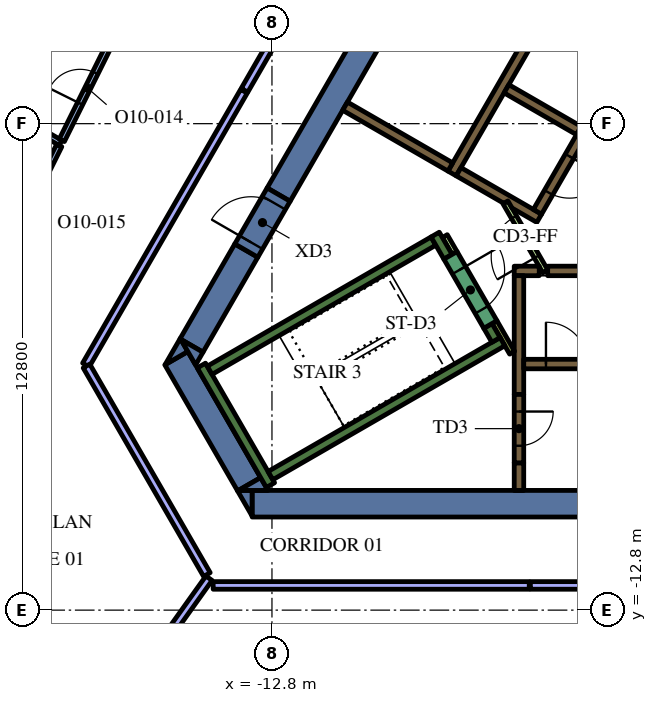
"""IFC4 building model, lengths in metres.
Left out: names, types, materials, properties, quantities, classifications, styles, units other than length and angle.
Written with IfcOpenShell. Run it as: python <this file> out.ifc"""

import sys

from ifc_helpers import new_model, si_unit, direction, frame, frame_2d, origin, place, context, subcontext, project, spatial, polyline, rectangle, outline, extrude, element, fill, save


model = new_model("IFC4")
c1 = context("Model", 3, precision=1e-05, world=origin(), true_north=direction((0.0, 1.0)))
c2 = subcontext(c1, "Body", "Model", "MODEL_VIEW")
j1 = project(units=[si_unit("LENGTHUNIT", "METRE"), si_unit("PLANEANGLEUNIT", "RADIAN")], contexts=[c1])
p1 = place(None, origin())
s1 = spatial("IfcSite", under=j1, at=p1, CompositionType="ELEMENT")
p2 = place(p1, origin())
s2 = spatial("IfcBuilding", under=s1, at=p2, CompositionType="ELEMENT")
p3 = place(p2, frame((0.0, 0.0, 252.0)))
s3 = spatial("IfcBuildingStorey", under=s2, at=p3, CompositionType="ELEMENT", Elevation=252.0)
p4 = place(p3, frame((8.904, -10.0, 0.0), z_axis=(0.0, 0.0, 1.0), x_axis=(-1.0, 0.0, 0.0)))
e1 = element("IfcWall", 1, at=p4, inside=s3, PredefinedType="SOLIDWALL", context=c2, shape_type="SweptSolid", body=[
    extrude(rectangle(XDim=22.226, YDim=0.7, at=frame_2d((11.113, 0.0))), origin(), (0.0, 0.0, 1.0), 4.2),
])
p5 = place(p3, origin())
e2 = element("IfcWall", 2, at=p5, inside=s3, PredefinedType="SOLIDWALL", context=c2, shape_type="SweptSolid", body=[
    extrude(outline(polyline([(-13.712, -9.65), (-13.324, -9.65), (-13.324, -10.322), (-13.712, -9.65)])), origin(), (0.0, 0.0, 1.0), 4.2),
])
p6 = place(p3, frame((-13.402, -9.487, 0.0), z_axis=(0.0, 0.0, 1.0), x_axis=(-0.500020498207, 0.866013568815, 0.0)))
e3 = element("IfcWall", 3, at=p6, inside=s3, PredefinedType="SOLIDWALL", context=c2, shape_type="SweptSolid", body=[
    extrude(rectangle(XDim=3.829, YDim=0.7, at=frame_2d((1.915, 0.0))), origin(), (0.0, 0.0, 1.0), 4.2),
])
e4 = element("IfcWall", 4, at=p5, inside=s3, PredefinedType="SOLIDWALL", context=c2, shape_type="SweptSolid", body=[
    extrude(outline(polyline([(-15.014, -5.995), (-15.611, -6.339), (-15.213, -5.65), (-15.014, -5.995)])), origin(), (0.0, 0.0, 1.0), 4.2),
])
e5 = element("IfcWall", 5, at=p5, inside=s3, PredefinedType="SOLIDWALL", context=c2, shape_type="SweptSolid", body=[
    extrude(outline(polyline([(-12.904, -9.65), (-13.68, -9.65), (-13.098, -9.314), (-12.904, -9.65)])), origin(), (0.0, 0.0, 1.0), 4.2),
])
p7 = place(p3, frame((-13.475, -3.339, 0.0), z_axis=(0.0, 0.0, 1.0), x_axis=(-0.500008214683, -0.866020660983, 0.0)))
e6 = element("IfcWall", 6, at=p7, inside=s3, PredefinedType="SOLIDWALL", context=c2, shape_type="SweptSolid", body=[
    extrude(rectangle(XDim=2.884, YDim=0.7, at=frame_2d((1.442, 0.0))), origin(), (0.0, 0.0, 1.0), 4.2),
])
e7 = element("IfcWall", 7, at=p5, inside=s3, PredefinedType="SOLIDWALL", context=c2, shape_type="SweptSolid", body=[
    extrude(outline(polyline([(-14.809, -6.35), (-15.197, -5.678), (-14.615, -6.014), (-14.809, -6.35)])), origin(), (0.0, 0.0, 1.0), 4.2),
])
p8 = place(p3, frame((-12.625, -1.867, 0.0), z_axis=(0.0, 0.0, 1.0), x_axis=(0.499996974394, 0.866027150612, 0.0)))
e8 = element("IfcWall", 8, at=p8, inside=s3, PredefinedType="SOLIDWALL", context=c2, shape_type="SweptSolid", body=[
    extrude(rectangle(XDim=15.858, YDim=0.7, at=frame_2d((7.929, 0.0))), origin(), (0.0, 0.0, 1.0), 4.2),
])
p9 = place(p3, frame((-12.84, -9.511, 0.0), z_axis=(0.0, 0.0, 1.0), x_axis=(-0.499997733992, 0.866026712061, 0.0)))
e9 = element("IfcWall", 9, at=p9, inside=s3, PredefinedType="SOLIDWALL", context=c2, shape_type="SweptSolid", body=[
    extrude(rectangle(XDim=3.634, YDim=0.25, at=frame_2d((1.817, 0.0))), origin(), (0.0, 0.0, 1.0), 4.2),
])
p10 = place(p3, frame((-14.44, -6.49, 0.0), z_axis=(0.0, 0.0, 1.0), x_axis=(0.866022966069, 0.500004222222, 0.0)))
e10 = element("IfcWall", 10, at=p10, inside=s3, PredefinedType="SOLIDWALL", context=c2, shape_type="SweptSolid", body=[
    extrude(rectangle(XDim=6.8, YDim=0.25, at=frame_2d((3.4, 0.0))), origin(), (0.0, 0.0, 1.0), 4.2),
])
p11 = place(p3, frame((-8.168, -3.503, 0.0), z_axis=(0.0, 0.0, 1.0), x_axis=(-0.499952099219, 0.866053057547, 0.0)))
e11 = element("IfcWall", 11, at=p11, inside=s3, PredefinedType="SOLIDWALL", context=c2, shape_type="SweptSolid", body=[
    extrude(rectangle(XDim=0.675, YDim=0.25, at=frame_2d((0.337, 0.0))), origin(), (0.0, 0.0, 1.0), 4.2),
])
p12 = place(p3, frame((-12.84, -9.261, 0.0), z_axis=(0.0, 0.0, 1.0), x_axis=(0.866016039709, 0.500016218704, 0.0)))
e12 = element("IfcWall", 12, at=p12, inside=s3, PredefinedType="SOLIDWALL", context=c2, shape_type="SweptSolid", body=[
    extrude(rectangle(XDim=7.05, YDim=0.25, at=frame_2d((3.525, 0.0))), origin(), (0.0, 0.0, 1.0), 4.2),
])
p13 = place(p3, frame((-6.905, -5.69, 0.0), z_axis=(0.0, 0.0, 1.0), x_axis=(-0.500402024738, 0.865793170242, 0.0)))
e13 = element("IfcWall", 13, at=p13, inside=s3, PredefinedType="SOLIDWALL", context=c2, shape_type="SweptSolid", body=[
    extrude(rectangle(XDim=0.425, YDim=0.25, at=frame_2d((0.212, 0.0))), origin(), (0.0, 0.0, 1.0), 4.2),
])
p14 = place(p3, frame((-6.3, -8.925, 0.0), z_axis=(0.0, 0.0, 1.0), x_axis=(0.0, -1.0, 0.0)))
e14 = element("IfcWall", 14, at=p14, inside=s3, PredefinedType="SOLIDWALL", context=c2, shape_type="SweptSolid", body=[
    extrude(rectangle(XDim=0.725, YDim=0.25, at=frame_2d((0.363, 0.0))), origin(), (0.0, 0.0, 1.0), 4.2),
])
p15 = place(p3, frame((-5.545, -3.875, 0.0), z_axis=(0.0, 0.0, 1.0), x_axis=(1.0, 0.0, 0.0)))
e15 = element("IfcWall", 15, at=p15, inside=s3, PredefinedType="SOLIDWALL", context=c2, shape_type="SweptSolid", body=[
    extrude(rectangle(XDim=11.97, YDim=0.25, at=frame_2d((5.985, 0.0))), origin(), (0.0, 0.0, 1.0), 4.2),
])
p16 = place(p3, frame((-6.425, -3.875, 0.0), z_axis=(0.0, 0.0, 1.0), x_axis=(1.0, 0.0, 0.0)))
e16 = element("IfcWall", 16, at=p16, inside=s3, PredefinedType="SOLIDWALL", context=c2, shape_type="SweptSolid", body=[
    extrude(rectangle(XDim=0.658, YDim=0.25, at=frame_2d((0.329, 0.0))), origin(), (0.0, 0.0, 1.0), 4.2),
])
p17 = place(p3, frame((-6.3, -7.125, 0.0), z_axis=(0.0, 0.0, 1.0), x_axis=(0.0, 1.0, 0.0)))
e17 = element("IfcWall", 17, at=p17, inside=s3, PredefinedType="SOLIDWALL", context=c2, shape_type="SweptSolid", body=[
    extrude(rectangle(XDim=3.125, YDim=0.25, at=frame_2d((1.562, 0.0))), origin(), (0.0, 0.0, 1.0), 4.2),
])
p18 = place(p3, frame((-8.06, -1.311, 0.0), z_axis=(0.0, 0.0, 1.0), x_axis=(0.50000273126, 0.866023826885, 0.0)))
e18 = element("IfcWall", 18, at=p18, inside=s3, PredefinedType="SOLIDWALL", context=c2, shape_type="SweptSolid", body=[
    extrude(rectangle(XDim=10.33, YDim=0.25, at=frame_2d((5.165, 0.0))), origin(), (0.0, 0.0, 1.0), 4.2),
])
p19 = place(p3, frame((-4.724, -0.182, 0.0), z_axis=(0.0, 0.0, 1.0), x_axis=(-0.866008176907, 0.50002983664, 0.0)))
e19 = element("IfcWall", 19, at=p19, inside=s3, PredefinedType="SOLIDWALL", context=c2, shape_type="SweptSolid", body=[
    extrude(rectangle(XDim=2.2, YDim=0.25, at=frame_2d((1.1, 0.0))), origin(), (0.0, 0.0, 1.0), 4.2),
])
e20 = element("IfcWall", 20, at=p5, inside=s3, PredefinedType="SOLIDWALL", context=c2, shape_type="SweptSolid", body=[
    extrude(outline(polyline([(-5.922, -2.257), (-5.922, -2.257), (-5.705, -2.382), (-5.83, -2.598), (-6.483, -2.221), (-6.591, -2.033), (-6.591, -2.033), (-6.7, -2.096), (-7.952, -1.373), (-7.827, -1.156), (-5.922, -2.257)])), origin(), (0.0, 0.0, 1.0), 4.2),
])
p20 = place(p3, frame((-8.106, -1.14, 0.0), z_axis=(0.0, 0.0, 1.0), x_axis=(-0.866008981251, 0.500028443584, 0.0)))
e21 = element("IfcWall", 21, at=p20, inside=s3, PredefinedType="SOLIDWALL", context=c2, shape_type="SweptSolid", body=[
    extrude(rectangle(XDim=3.2, YDim=0.25, at=frame_2d((1.6, 0.0))), origin(), (0.0, 0.0, 1.0), 4.2),
])
p21 = place(p3, frame((-8.252, -2.958, 0.0), z_axis=(0.0, 0.0, 1.0), x_axis=(0.500174715838, -0.865924508047, 0.0)))
e22 = element("IfcWall", 22, at=p21, inside=s3, PredefinedType="PARTITIONING", context=c2, shape_type="SweptSolid", body=[
    extrude(rectangle(XDim=0.514, YDim=0.15, at=frame_2d((0.257, 0.0))), origin(), (0.0, 0.0, 1.0), 3.4),
])
p22 = place(p3, frame((-6.48, -6.027, 0.0), z_axis=(0.0, 0.0, 1.0), x_axis=(-0.499927229454, 0.866067413802, 0.0)))
e23 = element("IfcWall", 23, at=p22, inside=s3, PredefinedType="PARTITIONING", context=c2, shape_type="SweptSolid", body=[
    extrude(rectangle(XDim=0.929, YDim=0.15, at=frame_2d((0.464, 0.0))), origin(), (0.0, 0.0, 1.0), 4.2),
])
p23 = place(p3, frame((-6.175, -6.325, 0.0), z_axis=(0.0, 0.0, 1.0), x_axis=(1.0, 0.0, 0.0)))
e24 = element("IfcWall", 24, at=p23, inside=s3, PredefinedType="SOLIDWALL", context=c2, shape_type="SweptSolid", body=[
    extrude(rectangle(XDim=12.35, YDim=0.25, at=frame_2d((6.175, 0.0))), origin(), (0.0, 0.0, 1.0), 4.2),
])
p24 = place(p23, frame((0.585, 0.0, 0.0)))
e25 = element("IfcOpeningElement", 25, at=p24, cuts=e24, PredefinedType="OPENING", context=c2, shape_type="SweptSolid", body=[
    extrude(rectangle(XDim=1.1, YDim=2.1, at=frame_2d((0.55, 1.05))), frame((0.0, 0.135, 0.0), z_axis=(0.0, -1.0, 0.0), x_axis=(1.0, 0.0, 0.0)), (0.0, 0.0, 1.0), 0.27),
])
p25 = place(p23, frame((3.105, 0.0, 0.0)))
e26 = element("IfcOpeningElement", 26, at=p25, cuts=e24, PredefinedType="OPENING", context=c2, shape_type="SweptSolid", body=[
    extrude(rectangle(XDim=1.1, YDim=2.1, at=frame_2d((0.55, 1.05))), frame((0.0, 0.135, 0.0), z_axis=(0.0, -1.0, 0.0), x_axis=(1.0, 0.0, 0.0)), (0.0, 0.0, 1.0), 0.27),
])
p26 = place(p23, frame((5.625, 0.0, 0.0)))
e27 = element("IfcOpeningElement", 27, at=p26, cuts=e24, PredefinedType="OPENING", context=c2, shape_type="SweptSolid", body=[
    extrude(rectangle(XDim=1.1, YDim=2.1, at=frame_2d((0.55, 1.05))), frame((0.0, 0.135, 0.0), z_axis=(0.0, -1.0, 0.0), x_axis=(1.0, 0.0, 0.0)), (0.0, 0.0, 1.0), 0.27),
])
p27 = place(p23, frame((8.145, 0.0, 0.0)))
e28 = element("IfcOpeningElement", 28, at=p27, cuts=e24, PredefinedType="OPENING", context=c2, shape_type="SweptSolid", body=[
    extrude(rectangle(XDim=1.1, YDim=2.1, at=frame_2d((0.55, 1.05))), frame((0.0, 0.135, 0.0), z_axis=(0.0, -1.0, 0.0), x_axis=(1.0, 0.0, 0.0)), (0.0, 0.0, 1.0), 0.27),
])
p28 = place(p23, frame((10.665, 0.0, 0.0)))
e29 = element("IfcOpeningElement", 29, at=p28, cuts=e24, PredefinedType="OPENING", context=c2, shape_type="SweptSolid", body=[
    extrude(rectangle(XDim=1.1, YDim=2.1, at=frame_2d((0.55, 1.05))), frame((0.0, 0.135, 0.0), z_axis=(0.0, -1.0, 0.0), x_axis=(1.0, 0.0, 0.0)), (0.0, 0.0, 1.0), 0.27),
])
p29 = place(p3, frame((-0.898, 6.194, 0.0), z_axis=(0.0, 0.0, 1.0), x_axis=(-0.499996202215, -0.866027596426, 0.0)))
e30 = element("IfcWall", 30, at=p29, inside=s3, PredefinedType="SOLIDWALL", context=c2, shape_type="SweptSolid", body=[
    extrude(rectangle(XDim=9.83, YDim=0.25, at=frame_2d((4.915, 0.0))), origin(), (0.0, 0.0, 1.0), 4.2),
])
p30 = place(p29, frame((0.585, 0.0, 0.0)))
e31 = element("IfcOpeningElement", 31, at=p30, cuts=e30, PredefinedType="OPENING", context=c2, shape_type="SweptSolid", body=[
    extrude(rectangle(XDim=1.1, YDim=2.1, at=frame_2d((0.55, 1.05))), frame((0.0, 0.135, 0.0), z_axis=(0.0, -1.0, 0.0), x_axis=(1.0, 0.0, 0.0)), (0.0, 0.0, 1.0), 0.27),
])
p31 = place(p29, frame((3.105, 0.0, 0.0)))
e32 = element("IfcOpeningElement", 32, at=p31, cuts=e30, PredefinedType="OPENING", context=c2, shape_type="SweptSolid", body=[
    extrude(rectangle(XDim=1.1, YDim=2.1, at=frame_2d((0.55, 1.05))), frame((0.0, 0.135, 0.0), z_axis=(0.0, -1.0, 0.0), x_axis=(1.0, 0.0, 0.0)), (0.0, 0.0, 1.0), 0.27),
])
p32 = place(p29, frame((5.625, 0.0, 0.0)))
e33 = element("IfcOpeningElement", 33, at=p32, cuts=e30, PredefinedType="OPENING", context=c2, shape_type="SweptSolid", body=[
    extrude(rectangle(XDim=1.1, YDim=2.1, at=frame_2d((0.55, 1.05))), frame((0.0, 0.135, 0.0), z_axis=(0.0, -1.0, 0.0), x_axis=(1.0, 0.0, 0.0)), (0.0, 0.0, 1.0), 0.27),
])
p33 = place(p29, frame((8.145, 0.0, 0.0)))
e34 = element("IfcOpeningElement", 34, at=p33, cuts=e30, PredefinedType="OPENING", context=c2, shape_type="SweptSolid", body=[
    extrude(rectangle(XDim=1.1, YDim=2.1, at=frame_2d((0.55, 1.05))), frame((0.0, 0.135, 0.0), z_axis=(0.0, -1.0, 0.0), x_axis=(1.0, 0.0, 0.0)), (0.0, 0.0, 1.0), 0.27),
])
p34 = place(p3, frame((-8.103, -3.466, 0.0), z_axis=(0.0, 0.0, 1.0), x_axis=(0.500078061341, -0.865980330357, 0.0)))
e35 = element("IfcWall", 35, at=p34, inside=s3, PredefinedType="SOLIDWALL", context=c2, shape_type="SweptSolid", body=[
    extrude(rectangle(XDim=2.1, YDim=0.4, at=frame_2d((1.05, 0.0))), origin(), (0.0, 0.0, 1.0), 4.2),
])
p35 = place(p34, frame((0.45, 0.0, 0.0)))
e36 = element("IfcOpeningElement", 36, at=p35, cuts=e35, PredefinedType="OPENING", context=c2, shape_type="SweptSolid", body=[
    extrude(rectangle(XDim=1.2, YDim=2.1, at=frame_2d((0.6, 1.05))), frame((0.0, 0.21, 0.0), z_axis=(0.0, -1.0, 0.0), x_axis=(1.0, 0.0, 0.0)), (0.0, 0.0, 1.0), 0.42),
])
p36 = place(p3, frame((-6.3, -7.125, 0.0), z_axis=(0.0, 0.0, 1.0), x_axis=(0.0, -1.0, 0.0)))
e37 = element("IfcWall", 37, at=p36, inside=s3, PredefinedType="SOLIDWALL", context=c2, shape_type="SweptSolid", body=[
    extrude(rectangle(XDim=1.8, YDim=0.25, at=frame_2d((0.9, 0.0))), origin(), (0.0, 0.0, 1.0), 4.2),
])
p37 = place(p36, frame((0.45, 0.0, 0.0)))
e38 = element("IfcOpeningElement", 38, at=p37, cuts=e37, PredefinedType="OPENING", context=c2, shape_type="SweptSolid", body=[
    extrude(rectangle(XDim=0.9, YDim=2.1, at=frame_2d((0.45, 1.05))), frame((0.0, 0.135, 0.0), z_axis=(0.0, -1.0, 0.0), x_axis=(1.0, 0.0, 0.0)), (0.0, 0.0, 1.0), 0.27),
])
p38 = place(p3, frame((-5.606, -3.89, 0.0), z_axis=(0.0, 0.0, 1.0), x_axis=(-0.500027713859, 0.866009402589, 0.0)))
e39 = element("IfcWall", 39, at=p38, inside=s3, PredefinedType="PARTITIONING", context=c2, shape_type="SweptSolid", body=[
    extrude(rectangle(XDim=2.1, YDim=0.15, at=frame_2d((1.05, 0.0))), origin(), (0.0, 0.0, 1.0), 3.4),
])
p39 = place(p38, frame((0.45, 0.0, 0.0)))
e40 = element("IfcOpeningElement", 40, at=p39, cuts=e39, PredefinedType="OPENING", context=c2, shape_type="SweptSolid", body=[
    extrude(rectangle(XDim=1.2, YDim=2.1, at=frame_2d((0.6, 1.05))), frame((0.0, 0.085, 0.0), z_axis=(0.0, -1.0, 0.0), x_axis=(1.0, 0.0, 0.0)), (0.0, 0.0, 1.0), 0.17),
])
p40 = place(p3, frame((-13.475, -3.339, 0.0), z_axis=(0.0, 0.0, 1.0), x_axis=(0.499954529098, 0.86605165483, 0.0)))
e41 = element("IfcWall", 41, at=p40, inside=s3, PredefinedType="SOLIDWALL", context=c2, shape_type="SweptSolid", body=[
    extrude(rectangle(XDim=1.7, YDim=0.7, at=frame_2d((0.85, 0.0))), origin(), (0.0, 0.0, 1.0), 4.2),
])
p41 = place(p40, frame((0.25, 0.0, 0.0)))
e42 = element("IfcOpeningElement", 42, at=p41, cuts=e41, PredefinedType="OPENING", context=c2, shape_type="SweptSolid", body=[
    extrude(rectangle(XDim=1.2, YDim=2.1, at=frame_2d((0.6, 1.05))), frame((0.0, 0.36, 0.0), z_axis=(0.0, -1.0, 0.0), x_axis=(1.0, 0.0, 0.0)), (0.0, 0.0, 1.0), 0.72),
])
p42 = place(p3, frame((-16.604, -14.968, 0.0), z_axis=(0.0, 0.0, 1.0), x_axis=(0.581000735813, 0.813903031684, 0.0)))
e43 = element("IfcWall", 43, at=p42, inside=s3, PredefinedType="PARTITIONING", context=c2, shape_type="SweptSolid", body=[
    extrude(rectangle(XDim=3.696, YDim=0.2, at=frame_2d((1.848, 0.0))), origin(), (0.0, 0.0, 1.0), 3.4),
])
p43 = place(p3, frame((-6.0, -12.15, 0.0), z_axis=(0.0, 0.0, 1.0), x_axis=(1.0, 0.0, 0.0)))
e44 = element("IfcWall", 44, at=p43, inside=s3, PredefinedType="PARTITIONING", context=c2, shape_type="SweptSolid", body=[
    extrude(rectangle(XDim=12.0, YDim=0.2, at=frame_2d((6.0, 0.0))), origin(), (0.0, 0.0, 1.0), 3.4),
])
p44 = place(p43, frame((5.5, 0.0, 0.0)))
e45 = element("IfcOpeningElement", 45, at=p44, cuts=e44, PredefinedType="OPENING", context=c2, shape_type="SweptSolid", body=[
    extrude(rectangle(XDim=1.0, YDim=2.1, at=frame_2d((0.5, 1.05))), frame((0.0, 0.11, 0.0), z_axis=(0.0, -1.0, 0.0), x_axis=(1.0, 0.0, 0.0)), (0.0, 0.0, 1.0), 0.22),
])
p45 = place(p3, frame((-14.347, -12.15, 0.0), z_axis=(0.0, 0.0, 1.0), x_axis=(1.0, 0.0, 0.0)))
e46 = element("IfcWall", 46, at=p45, inside=s3, PredefinedType="PARTITIONING", context=c2, shape_type="SweptSolid", body=[
    extrude(rectangle(XDim=8.317, YDim=0.2, at=frame_2d((4.159, 0.0))), origin(), (0.0, 0.0, 1.0), 3.4),
])
p46 = place(p3, frame((-18.363, -0.506, 0.0), z_axis=(0.0, 0.0, 1.0), x_axis=(-0.866048087663, 0.499960708312, 0.0)))
e47 = element("IfcWall", 47, at=p46, inside=s3, PredefinedType="PARTITIONING", context=c2, shape_type="SweptSolid", body=[
    extrude(rectangle(XDim=3.607, YDim=0.15, at=frame_2d((1.804, 0.0))), origin(), (0.0, 0.0, 1.0), 3.4),
])
p47 = place(p3, frame((-18.33, -0.438, 0.0), z_axis=(0.0, 0.0, 1.0), x_axis=(0.445184199442, 0.895439014432, 0.0)))
e48 = element("IfcWall", 48, at=p47, inside=s3, PredefinedType="PARTITIONING", context=c2, shape_type="SweptSolid", body=[
    extrude(rectangle(XDim=3.082, YDim=0.15, at=frame_2d((1.541, 0.0))), origin(), (0.0, 0.0, 1.0), 3.4),
])
p48 = place(p47, frame((1.081, 0.0, 0.0)))
e49 = element("IfcOpeningElement", 49, at=p48, cuts=e48, PredefinedType="OPENING", context=c2, shape_type="SweptSolid", body=[
    extrude(rectangle(XDim=0.9, YDim=2.1, at=frame_2d((0.45, 1.05))), frame((0.0, 0.085, 0.0), z_axis=(0.0, -1.0, 0.0), x_axis=(1.0, 0.0, 0.0)), (0.0, 0.0, 1.0), 0.17),
])
p49 = place(p3, frame((-19.648, -3.09, 0.0), z_axis=(0.0, 0.0, 1.0), x_axis=(0.445162501923, 0.89544980143, 0.0)))
e50 = element("IfcWall", 50, at=p49, inside=s3, PredefinedType="PARTITIONING", context=c2, shape_type="SweptSolid", body=[
    extrude(rectangle(XDim=2.811, YDim=0.15, at=frame_2d((1.405, 0.0))), origin(), (0.0, 0.0, 1.0), 3.4),
])
p50 = place(p49, frame((0.911, 0.0, 0.0)))
e51 = element("IfcOpeningElement", 51, at=p50, cuts=e50, PredefinedType="OPENING", context=c2, shape_type="SweptSolid", body=[
    extrude(rectangle(XDim=0.9, YDim=2.1, at=frame_2d((0.45, 1.05))), frame((0.0, 0.085, 0.0), z_axis=(0.0, -1.0, 0.0), x_axis=(1.0, 0.0, 0.0)), (0.0, 0.0, 1.0), 0.17),
])
p51 = place(p3, frame((-8.956, 8.789, 0.0), z_axis=(0.0, 0.0, 1.0), x_axis=(-0.500000119864, -0.866025334581, 0.0)))
e52 = element("IfcWall", 52, at=p51, inside=s3, PredefinedType="PARTITIONING", context=c2, shape_type="SweptSolid", body=[
    extrude(rectangle(XDim=9.133, YDim=0.2, at=frame_2d((4.567, 0.0))), origin(), (0.0, 0.0, 1.0), 3.4),
])
p52 = place(p51, frame((4.1, 0.0, 0.0)))
e53 = element("IfcOpeningElement", 53, at=p52, cuts=e52, PredefinedType="OPENING", context=c2, shape_type="SweptSolid", body=[
    extrude(rectangle(XDim=1.0, YDim=2.1, at=frame_2d((0.5, 1.05))), frame((0.0, 0.11, 0.0), z_axis=(0.0, -1.0, 0.0), x_axis=(1.0, 0.0, 0.0)), (0.0, 0.0, 1.0), 0.22),
])
p53 = place(p3, frame((-13.537, 0.853, 0.0), z_axis=(0.0, 0.0, 1.0), x_axis=(-0.500009576767, -0.866019874565, 0.0)))
e54 = element("IfcWall", 54, at=p53, inside=s3, PredefinedType="PARTITIONING", context=c2, shape_type="SweptSolid", body=[
    extrude(rectangle(XDim=8.317, YDim=0.2, at=frame_2d((4.159, 0.0))), origin(), (0.0, 0.0, 1.0), 3.4),
])
p54 = place(p3, frame((-17.681, -6.376, 0.0), z_axis=(0.0, 0.0, 1.0), x_axis=(0.500017005442, -0.866015585465, 0.0)))
e55 = element("IfcWall", 55, at=p54, inside=s3, PredefinedType="PARTITIONING", context=c2, shape_type="SweptSolid", body=[
    extrude(rectangle(XDim=6.338, YDim=0.2, at=frame_2d((3.169, 0.0))), origin(), (0.0, 0.0, 1.0), 3.4),
])
p55 = place(p24, origin())
e56 = element("IfcDoor", 56, at=p55, inside=s3, OperationType="DOUBLE_DOOR_SLIDING", PredefinedType="DOOR", context=c2, shape_type="SweptSolid", body=[
    extrude(rectangle(XDim=1.1, YDim=2.1, at=frame_2d((0.55, 1.05))), frame((0.0, 0.025, 0.0), z_axis=(0.0, -1.0, 0.0), x_axis=(1.0, 0.0, 0.0)), (0.0, 0.0, 1.0), 0.05),
])
fill(e25, e56)
p56 = place(p33, origin())
e57 = element("IfcDoor", 57, at=p56, inside=s3, OperationType="DOUBLE_DOOR_SLIDING", PredefinedType="DOOR", context=c2, shape_type="SweptSolid", body=[
    extrude(rectangle(XDim=1.1, YDim=2.1, at=frame_2d((0.55, 1.05))), frame((0.0, 0.025, 0.0), z_axis=(0.0, -1.0, 0.0), x_axis=(1.0, 0.0, 0.0)), (0.0, 0.0, 1.0), 0.05),
])
fill(e34, e57)
p57 = place(p35, origin())
e58 = element("IfcDoor", 58, at=p57, inside=s3, OperationType="SINGLE_SWING_LEFT", PredefinedType="DOOR", context=c2, shape_type="SweptSolid", body=[
    extrude(rectangle(XDim=1.2, YDim=2.1, at=frame_2d((0.6, 1.05))), frame((0.0, 0.025, 0.0), z_axis=(0.0, -1.0, 0.0), x_axis=(1.0, 0.0, 0.0)), (0.0, 0.0, 1.0), 0.05),
])
fill(e36, e58)
p58 = place(p37, origin())
e59 = element("IfcDoor", 59, at=p58, inside=s3, OperationType="SINGLE_SWING_LEFT", PredefinedType="DOOR", context=c2, shape_type="SweptSolid", body=[
    extrude(rectangle(XDim=0.9, YDim=2.1, at=frame_2d((0.45, 1.05))), frame((0.0, 0.025, 0.0), z_axis=(0.0, -1.0, 0.0), x_axis=(1.0, 0.0, 0.0)), (0.0, 0.0, 1.0), 0.05),
])
fill(e38, e59)
p59 = place(p39, origin())
e60 = element("IfcDoor", 60, at=p59, inside=s3, OperationType="SINGLE_SWING_LEFT", PredefinedType="DOOR", context=c2, shape_type="SweptSolid", body=[
    extrude(rectangle(XDim=1.2, YDim=2.1, at=frame_2d((0.6, 1.05))), frame((0.0, 0.025, 0.0), z_axis=(0.0, -1.0, 0.0), x_axis=(1.0, 0.0, 0.0)), (0.0, 0.0, 1.0), 0.05),
])
fill(e40, e60)
p60 = place(p41, origin())
e61 = element("IfcDoor", 61, at=p60, inside=s3, OperationType="SINGLE_SWING_LEFT", PredefinedType="DOOR", context=c2, shape_type="SweptSolid", body=[
    extrude(rectangle(XDim=1.2, YDim=2.1, at=frame_2d((0.6, 1.05))), frame((0.0, 0.025, 0.0), z_axis=(0.0, -1.0, 0.0), x_axis=(1.0, 0.0, 0.0)), (0.0, 0.0, 1.0), 0.05),
])
fill(e42, e61)
p61 = place(p48, origin())
e62 = element("IfcDoor", 62, at=p61, inside=s3, OperationType="SINGLE_SWING_LEFT", PredefinedType="DOOR", context=c2, shape_type="SweptSolid", body=[
    extrude(rectangle(XDim=0.9, YDim=2.1, at=frame_2d((0.45, 1.05))), frame((0.0, 0.025, 0.0), z_axis=(0.0, -1.0, 0.0), x_axis=(1.0, 0.0, 0.0)), (0.0, 0.0, 1.0), 0.05),
])
fill(e49, e62)
save(model, sys.argv[1])
